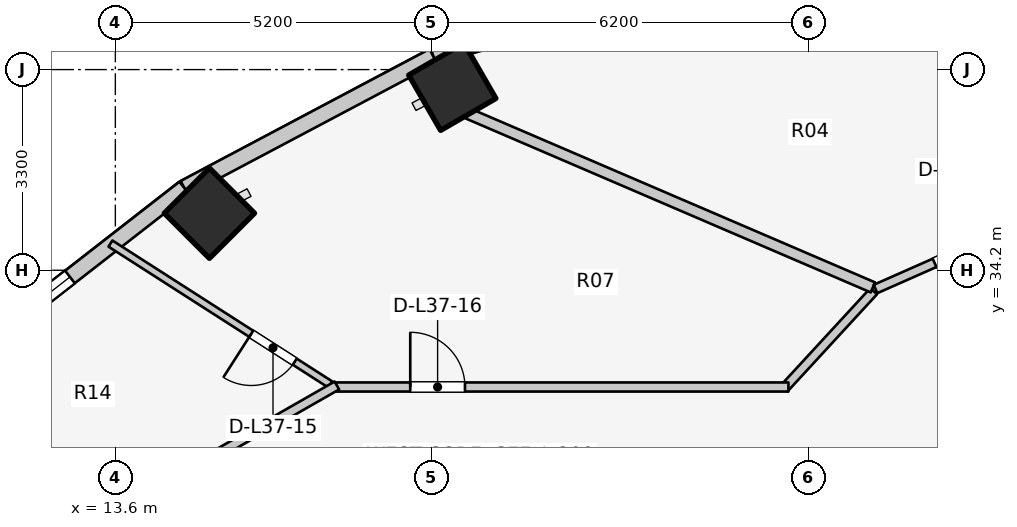
"""IFC4 building model, lengths in metres.
Left out: names, types, materials, properties, quantities, classifications, styles, units other than length and angle.
Written with IfcOpenShell. Run it as: python <this file> out.ifc"""

import sys

from ifc_helpers import new_model, si_unit, direction, frame, frame_2d, origin, origin_2d, place, context, subcontext, project, spatial, rectangle, extrude, element, fill, save


model = new_model("IFC4")
c1 = context("Model", 3, precision=1e-05, world=origin(), true_north=direction((0.0, 1.0)))
c2 = subcontext(c1, "Body", "Model", "MODEL_VIEW")
j1 = project(units=[si_unit("LENGTHUNIT", "METRE"), si_unit("PLANEANGLEUNIT", "RADIAN")], contexts=[c1])
p1 = place(None, origin())
s1 = spatial("IfcSite", under=j1, at=p1, CompositionType="ELEMENT")
p2 = place(p1, origin())
s2 = spatial("IfcBuilding", under=s1, at=p2, CompositionType="ELEMENT")
p3 = place(p2, frame((0.0, 0.0, 122.8)))
s3 = spatial("IfcBuildingStorey", under=s2, at=p3, CompositionType="ELEMENT", Elevation=122.8)
for number, where, z_axis, x_axis in (
    (1, (19.142, 37.218, 0.0), (0.0, 0.0, 1.0), (-0.5, 0.866, 0.0)),
    (2, (15.147, 35.138, 0.0), (0.0, 0.0, 1.0), (-0.707, 0.707, 0.0)),
):
    element("IfcColumn", number, at=place(p3, frame(where, z_axis=z_axis, x_axis=x_axis)), inside=s3, PredefinedType="COLUMN", context=c2, shape_type="SweptSolid", body=[
        extrude(rectangle(XDim=1.05, YDim=1.05, at=origin_2d()), origin(), (0.0, 0.0, 1.0), 3.1),
    ])
p4 = place(p3, frame((24.184, 39.222, 0.0), z_axis=(0.0, 0.0, 1.0), x_axis=(-0.962938491413, -0.269721081407, 0.0)))
e3 = element("IfcWall", 3, at=p4, inside=s3, PredefinedType="STANDARD", context=c2, shape_type="SweptSolid", body=[
    extrude(rectangle(XDim=5.563, YDim=0.26, at=frame_2d((2.782, 0.0))), origin(), (0.0, 0.0, 1.0), 2.85),
])
p5 = place(p4, frame((2.031, 0.0, 0.75)))
e4 = element("IfcOpeningElement", 4, at=p5, cuts=e3, PredefinedType="OPENING", context=c2, shape_type="SweptSolid", body=[
    extrude(rectangle(XDim=1.5, YDim=1.6, at=frame_2d((0.75, 0.8))), frame((0.0, 0.14, 0.0), z_axis=(0.0, -1.0, 0.0), x_axis=(1.0, 0.0, 0.0)), (0.0, 0.0, 1.0), 0.28),
])
p6 = place(p3, frame((18.827, 37.721, 0.0), z_axis=(0.0, 0.0, 1.0), x_axis=(-0.883668636807, -0.4681129568, 0.0)))
e5 = element("IfcWall", 5, at=p6, inside=s3, PredefinedType="STANDARD", context=c2, shape_type="SweptSolid", body=[
    extrude(rectangle(XDim=4.631, YDim=0.26, at=frame_2d((2.316, 0.0))), origin(), (0.0, 0.0, 1.0), 2.85),
])
p7 = place(p3, frame((14.734, 35.553, 0.0), z_axis=(0.0, 0.0, 1.0), x_axis=(-0.789127449954, -0.614229491094, 0.0)))
e6 = element("IfcWall", 6, at=p7, inside=s3, PredefinedType="STANDARD", context=c2, shape_type="SweptSolid", body=[
    extrude(rectangle(XDim=4.505, YDim=0.26, at=frame_2d((2.252, 0.0))), origin(), (0.0, 0.0, 1.0), 2.85),
])
p8 = place(p7, frame((2.383, 0.0, 0.75)))
e7 = element("IfcOpeningElement", 7, at=p8, cuts=e6, PredefinedType="OPENING", context=c2, shape_type="SweptSolid", body=[
    extrude(rectangle(XDim=1.2, YDim=1.5, at=frame_2d((0.6, 0.75))), frame((0.0, 0.14, 0.0), z_axis=(0.0, -1.0, 0.0), x_axis=(1.0, 0.0, 0.0)), (0.0, 0.0, 1.0), 0.28),
])
p9 = place(p3, frame((17.242, 32.253, 0.0), z_axis=(0.0, 0.0, 1.0), x_axis=(-0.841897149708, 0.539638016928, 0.0)))
e8 = element("IfcWall", 8, at=p9, inside=s3, PredefinedType="MOVABLE", context=c2, shape_type="SweptSolid", body=[
    extrude(rectangle(XDim=4.421, YDim=0.12, at=frame_2d((2.211, 0.0))), origin(), (0.0, 0.0, 1.0), 2.142),
])
p10 = place(p9, frame((0.821, 0.0, 0.0)))
e9 = element("IfcOpeningElement", 9, at=p10, cuts=e8, PredefinedType="OPENING", context=c2, shape_type="SweptSolid", body=[
    extrude(rectangle(XDim=0.85, YDim=2.05, at=frame_2d((0.425, 1.025))), frame((0.0, 0.07, 0.0), z_axis=(0.0, -1.0, 0.0), x_axis=(1.0, 0.0, 0.0)), (0.0, 0.0, 1.0), 0.14),
])
p11 = place(p3, frame((26.072, 33.856, 0.0), z_axis=(0.0, 0.0, 1.0), x_axis=(-0.677579737957, -0.735449317567, 0.0)))
e10 = element("IfcWall", 10, at=p11, inside=s3, PredefinedType="PARTITIONING", context=c2, shape_type="SweptSolid", body=[
    extrude(rectangle(XDim=2.173, YDim=0.15, at=frame_2d((1.086, 0.0))), origin(), (0.0, 0.0, 1.0), 2.272),
])
p12 = place(p3, frame((17.15, 32.28, 0.0), z_axis=(0.0, 0.0, 1.0), x_axis=(1.0, 0.0, 0.0)))
e11 = element("IfcWall", 11, at=p12, inside=s3, PredefinedType="PARTITIONING", context=c2, shape_type="SweptSolid", body=[
    extrude(rectangle(XDim=7.52, YDim=0.15, at=frame_2d((3.76, 0.0))), origin(), (0.0, 0.0, 1.0), 2.272),
])
p13 = place(p12, frame((1.3, 0.0, 0.0)))
e12 = element("IfcOpeningElement", 12, at=p13, cuts=e11, PredefinedType="OPENING", context=c2, shape_type="SweptSolid", body=[
    extrude(rectangle(XDim=0.9, YDim=2.1, at=frame_2d((0.45, 1.05))), frame((0.0, 0.085, 0.0), z_axis=(0.0, -1.0, 0.0), x_axis=(1.0, 0.0, 0.0)), (0.0, 0.0, 1.0), 0.17),
])
p14 = place(p3, frame((17.243, 32.305, 0.0), z_axis=(0.0, 0.0, 1.0), x_axis=(-0.867991349648, -0.496579315857, 0.0)))
e13 = element("IfcWall", 13, at=p14, inside=s3, PredefinedType="PARTITIONING", context=c2, shape_type="SweptSolid", body=[
    extrude(rectangle(XDim=2.567, YDim=0.15, at=frame_2d((1.283, 0.0))), origin(), (0.0, 0.0, 1.0), 2.142),
])
p15 = place(p3, frame((26.059, 33.918, 0.0), z_axis=(0.0, 0.0, 1.0), x_axis=(-0.918836579087, 0.394638240584, 0.0)))
e14 = element("IfcWall", 14, at=p15, inside=s3, PredefinedType="PARTITIONING", context=c2, shape_type="SweptSolid", body=[
    extrude(rectangle(XDim=7.253, YDim=0.18, at=frame_2d((3.626, 0.0))), origin(), (0.0, 0.0, 1.0), 2.272),
])
p16 = place(p3, frame((28.958, 35.156, 0.0), z_axis=(0.0, 0.0, 1.0), x_axis=(-0.914519212393, -0.40454247016, 0.0)))
e15 = element("IfcWall", 15, at=p16, inside=s3, PredefinedType="PARTITIONING", context=c2, shape_type="SweptSolid", body=[
    extrude(rectangle(XDim=3.124, YDim=0.15, at=frame_2d((1.562, 0.0))), origin(), (0.0, 0.0, 1.0), 2.272),
])
p17 = place(p16, frame((1.062, 0.0, 0.0)))
e16 = element("IfcOpeningElement", 16, at=p17, cuts=e15, PredefinedType="OPENING", context=c2, shape_type="SweptSolid", body=[
    extrude(rectangle(XDim=1.0, YDim=2.1, at=frame_2d((0.5, 1.05))), frame((0.0, 0.085, 0.0), z_axis=(0.0, -1.0, 0.0), x_axis=(1.0, 0.0, 0.0)), (0.0, 0.0, 1.0), 0.17),
])
p18 = place(p8, origin())
e17 = element("IfcWindow", 17, at=p18, inside=s3, PartitioningType="SINGLE_PANEL", PredefinedType="WINDOW", context=c2, shape_type="SweptSolid", body=[
    extrude(rectangle(XDim=1.2, YDim=1.5, at=frame_2d((0.6, 0.75))), frame((0.0, 0.03, 0.0), z_axis=(0.0, -1.0, 0.0), x_axis=(1.0, 0.0, 0.0)), (0.0, 0.0, 1.0), 0.06),
])
fill(e7, e17)
p19 = place(p10, origin())
e18 = element("IfcDoor", 18, at=p19, inside=s3, OperationType="SINGLE_SWING_RIGHT", PredefinedType="DOOR", context=c2, shape_type="SweptSolid", body=[
    extrude(rectangle(XDim=0.85, YDim=2.05, at=frame_2d((0.425, 1.025))), frame((0.0, 0.025, 0.0), z_axis=(0.0, -1.0, 0.0), x_axis=(1.0, 0.0, 0.0)), (0.0, 0.0, 1.0), 0.05),
])
fill(e9, e18)
p20 = place(p13, origin())
e19 = element("IfcDoor", 19, at=p20, inside=s3, OperationType="SINGLE_SWING_LEFT", PredefinedType="DOOR", context=c2, shape_type="SweptSolid", body=[
    extrude(rectangle(XDim=0.9, YDim=2.1, at=frame_2d((0.45, 1.05))), frame((0.0, 0.025, 0.0), z_axis=(0.0, -1.0, 0.0), x_axis=(1.0, 0.0, 0.0)), (0.0, 0.0, 1.0), 0.05),
])
fill(e12, e19)
p21 = place(p17, origin())
e20 = element("IfcDoor", 20, at=p21, inside=s3, OperationType="SINGLE_SWING_LEFT", PredefinedType="DOOR", context=c2, shape_type="SweptSolid", body=[
    extrude(rectangle(XDim=1.0, YDim=2.1, at=frame_2d((0.5, 1.05))), frame((0.0, 0.025, 0.0), z_axis=(0.0, -1.0, 0.0), x_axis=(1.0, 0.0, 0.0)), (0.0, 0.0, 1.0), 0.05),
])
fill(e16, e20)
save(model, sys.argv[1])
